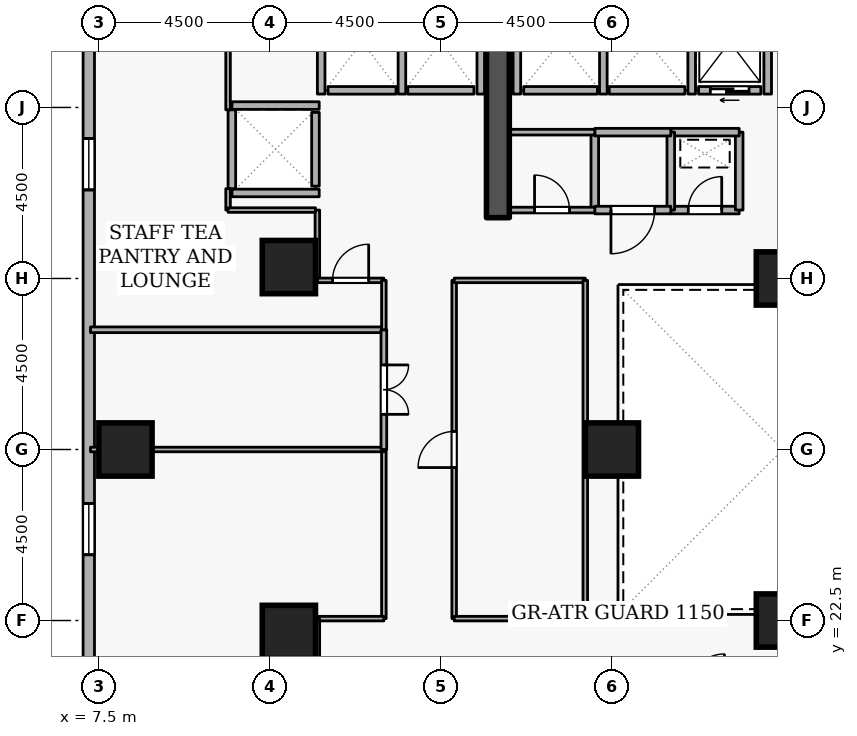
"""IFC4 building model, lengths in metres.
Left out: names, types, materials, properties, quantities, classifications, styles, units other than length and angle.
Written with IfcOpenShell. Run it as: python <this file> out.ifc"""

import sys

from ifc_helpers import new_model, si_unit, direction, frame, frame_2d, origin, origin_2d, place, context, subcontext, project, spatial, rectangle, extrude, element, fill, save


model = new_model("IFC4")
c1 = context("Model", 3, precision=1e-05, world=origin(), true_north=direction((0.0, 1.0)))
c2 = subcontext(c1, "Body", "Model", "MODEL_VIEW")
j1 = project(units=[si_unit("LENGTHUNIT", "METRE"), si_unit("PLANEANGLEUNIT", "RADIAN")], contexts=[c1])
p1 = place(None, origin())
s1 = spatial("IfcSite", under=j1, at=p1, CompositionType="ELEMENT")
p2 = place(p1, origin())
s2 = spatial("IfcBuilding", under=s1, at=p2, CompositionType="ELEMENT")
p3 = place(p2, frame((0.0, 0.0, 68.1)))
s3 = spatial("IfcBuildingStorey", under=s2, at=p3, CompositionType="ELEMENT", Elevation=68.1)
p4 = place(p3, frame((18.0, 33.1, 0.0), z_axis=(0.0, 0.0, 1.0), x_axis=(0.0, 1.0, 0.0)))
e1 = element("IfcWall", 1, at=p4, inside=s3, PredefinedType="SHEAR", context=c2, shape_type="SweptSolid", body=[
    extrude(rectangle(XDim=5.7, YDim=0.6, at=frame_2d((2.85, 0.0))), origin(), (0.0, 0.0, 1.0), 3.6),
])
for number, where, z_axis, x_axis in (
    (2, (8.2, 27.0, 0.0), (0.0, 0.0, 1.0), (1.0, 0.0, 0.0)),
    (3, (12.5, 22.2, 0.0), (0.0, 0.0, 1.0), (1.0, 0.0, 0.0)),
    (4, (12.5, 31.8, 0.0), (0.0, 0.0, 1.0), (1.0, 0.0, 0.0)),
    (5, (25.5, 22.5, 0.0), (0.0, 0.0, 1.0), (1.0, 0.0, 0.0)),
    (6, (25.5, 31.5, 0.0), (0.0, 0.0, 1.0), (1.0, 0.0, 0.0)),
    (7, (21.0, 27.0, 0.0), (0.0, 0.0, 1.0), (1.0, 0.0, 0.0)),
):
    element("IfcColumn", number, at=place(p3, frame(where, z_axis=z_axis, x_axis=x_axis)), inside=s3, PredefinedType="COLUMN", context=c2, shape_type="SweptSolid", body=[
        extrude(rectangle(XDim=1.4, YDim=1.4, at=origin_2d()), origin(), (0.0, 0.0, 1.0), 3.6),
    ])
p5 = place(p3, frame((7.235, 42.681, 0.0), z_axis=(0.0, 0.0, 1.0), x_axis=(0.0, -1.0, 0.0)))
e8 = element("IfcWall", 8, at=p5, inside=s3, PredefinedType="STANDARD", context=c2, shape_type="SweptSolid", body=[
    extrude(rectangle(XDim=37.362, YDim=0.3, at=frame_2d((18.681, 0.0))), origin(), (0.0, 0.0, 1.0), 2.66),
])
p6 = place(p5, frame((7.5, 0.0, 0.72)))
e9 = element("IfcOpeningElement", 9, at=p6, cuts=e8, PredefinedType="OPENING", context=c2, shape_type="SweptSolid", body=[
    extrude(rectangle(XDim=1.35, YDim=1.05, at=frame_2d((0.675, 0.525))), frame((0.0, 0.16, 0.0), z_axis=(0.0, -1.0, 0.0), x_axis=(1.0, 0.0, 0.0)), (0.0, 0.0, 1.0), 0.32),
])
p7 = place(p5, frame((17.1, 0.0, 0.72)))
e10 = element("IfcOpeningElement", 10, at=p7, cuts=e8, PredefinedType="OPENING", context=c2, shape_type="SweptSolid", body=[
    extrude(rectangle(XDim=1.35, YDim=1.05, at=frame_2d((0.675, 0.525))), frame((0.0, 0.16, 0.0), z_axis=(0.0, -1.0, 0.0), x_axis=(1.0, 0.0, 0.0)), (0.0, 0.0, 1.0), 0.32),
])
p8 = place(p5, frame((21.9, 0.0, 0.72)))
e11 = element("IfcOpeningElement", 11, at=p8, cuts=e8, PredefinedType="OPENING", context=c2, shape_type="SweptSolid", body=[
    extrude(rectangle(XDim=1.35, YDim=1.05, at=frame_2d((0.675, 0.525))), frame((0.0, 0.16, 0.0), z_axis=(0.0, -1.0, 0.0), x_axis=(1.0, 0.0, 0.0)), (0.0, 0.0, 1.0), 0.32),
])
p9 = place(p3, frame((24.92, 36.45, 0.0), z_axis=(0.0, 0.0, 1.0), x_axis=(-1.0, 0.0, 0.0)))
e12 = element("IfcWall", 12, at=p9, inside=s3, PredefinedType="STANDARD", context=c2, shape_type="SweptSolid", body=[
    extrude(rectangle(XDim=1.64, YDim=0.2, at=frame_2d((0.82, 0.0))), origin(), (0.0, 0.0, 1.0), 3.26),
])
p10 = place(p9, frame((0.31, 0.0, 0.0)))
e13 = element("IfcOpeningElement", 13, at=p10, cuts=e12, PredefinedType="OPENING", context=c2, shape_type="SweptSolid", body=[
    extrude(rectangle(XDim=1.02, YDim=2.06, at=frame_2d((0.51, 1.03))), frame((0.0, 0.11, 0.0), z_axis=(0.0, -1.0, 0.0), x_axis=(1.0, 0.0, 0.0)), (0.0, 0.0, 1.0), 0.22),
])
p11 = place(p3, frame((22.92, 36.45, 0.0), z_axis=(0.0, 0.0, 1.0), x_axis=(-1.0, 0.0, 0.0)))
e14 = element("IfcWall", 14, at=p11, inside=s3, PredefinedType="STANDARD", context=c2, shape_type="SweptSolid", body=[
    extrude(rectangle(XDim=1.99, YDim=0.2, at=frame_2d((0.995, 0.0))), origin(), (0.0, 0.0, 1.0), 3.26),
])
p12 = place(p3, frame((20.62, 36.45, 0.0), z_axis=(0.0, 0.0, 1.0), x_axis=(-1.0, 0.0, 0.0)))
e15 = element("IfcWall", 15, at=p12, inside=s3, PredefinedType="STANDARD", context=c2, shape_type="SweptSolid", body=[
    extrude(rectangle(XDim=1.94, YDim=0.2, at=frame_2d((0.97, 0.0))), origin(), (0.0, 0.0, 1.0), 3.26),
])
p13 = place(p3, frame((17.37, 36.45, 0.0), z_axis=(0.0, 0.0, 1.0), x_axis=(-1.0, 0.0, 0.0)))
e16 = element("IfcWall", 16, at=p13, inside=s3, PredefinedType="STANDARD", context=c2, shape_type="SweptSolid", body=[
    extrude(rectangle(XDim=1.74, YDim=0.2, at=frame_2d((0.87, 0.0))), origin(), (0.0, 0.0, 1.0), 3.26),
])
p14 = place(p3, frame((15.32, 36.45, 0.0), z_axis=(0.0, 0.0, 1.0), x_axis=(-1.0, 0.0, 0.0)))
e17 = element("IfcWall", 17, at=p14, inside=s3, PredefinedType="STANDARD", context=c2, shape_type="SweptSolid", body=[
    extrude(rectangle(XDim=1.79, YDim=0.2, at=frame_2d((0.895, 0.0))), origin(), (0.0, 0.0, 1.0), 3.26),
])
p15 = place(p3, frame((13.2, 33.93, 0.0), z_axis=(0.0, 0.0, 1.0), x_axis=(0.0, 1.0, 0.0)))
e18 = element("IfcWall", 18, at=p15, inside=s3, PredefinedType="STANDARD", context=c2, shape_type="SweptSolid", body=[
    extrude(rectangle(XDim=1.94, YDim=0.2, at=frame_2d((0.97, 0.0))), origin(), (0.0, 0.0, 1.0), 3.26),
])
for number, where, z_axis, x_axis in (
    (19, (25.1, 36.352, 0.0), (0.0, 0.0, 1.0), (0.0, 1.0, 0.0)),
    (20, (23.1, 36.352, 0.0), (0.0, 0.0, 1.0), (0.0, 1.0, 0.0)),
    (21, (20.775, 36.352, 0.0), (0.0, 0.0, 1.0), (0.0, 1.0, 0.0)),
    (22, (18.5, 36.352, 0.0), (0.0, 0.0, 1.0), (0.0, 1.0, 0.0)),
):
    element("IfcWall", number, at=place(p3, frame(where, z_axis=z_axis, x_axis=x_axis)), inside=s3, PredefinedType="STANDARD", context=c2, shape_type="SweptSolid", body=[
        extrude(rectangle(XDim=2.436, YDim=0.2, at=frame_2d((1.218, 0.0))), origin(), (0.0, 0.0, 1.0), 3.26),
    ])
p16 = place(p3, frame((17.55, 36.352, 0.0), z_axis=(0.0, 0.0, 1.0), x_axis=(0.0, 1.0, 0.0)))
e23 = element("IfcWall", 23, at=p16, inside=s3, PredefinedType="STANDARD", context=c2, shape_type="SweptSolid", body=[
    extrude(rectangle(XDim=2.636, YDim=0.2, at=frame_2d((1.318, 0.0))), origin(), (0.0, 0.0, 1.0), 2.465),
])
for number, where, z_axis, x_axis in (
    (24, (15.475, 36.352, 0.0), (0.0, 0.0, 1.0), (0.0, 1.0, 0.0)),
    (25, (13.35, 36.352, 0.0), (0.0, 0.0, 1.0), (0.0, 1.0, 0.0)),
):
    element("IfcWall", number, at=place(p3, frame(where, z_axis=z_axis, x_axis=x_axis)), inside=s3, PredefinedType="STANDARD", context=c2, shape_type="SweptSolid", body=[
        extrude(rectangle(XDim=2.636, YDim=0.2, at=frame_2d((1.318, 0.0))), origin(), (0.0, 0.0, 1.0), 3.26),
    ])
for number, where, z_axis, x_axis in (
    (26, (11.002, 36.05, 0.0), (0.0, 0.0, 1.0), (1.0, 0.0, 0.0)),
    (27, (11.002, 33.75, 0.0), (0.0, 0.0, 1.0), (1.0, 0.0, 0.0)),
):
    element("IfcWall", number, at=place(p3, frame(where, z_axis=z_axis, x_axis=x_axis)), inside=s3, PredefinedType="STANDARD", context=c2, shape_type="SweptSolid", body=[
        extrude(rectangle(XDim=2.296, YDim=0.2, at=frame_2d((1.148, 0.0))), origin(), (0.0, 0.0, 1.0), 3.26),
    ])
p17 = place(p3, frame((11.0, 33.862, 0.0), z_axis=(0.0, 0.0, 1.0), x_axis=(0.0, 1.0, 0.0)))
e28 = element("IfcWall", 28, at=p17, inside=s3, PredefinedType="STANDARD", context=c2, shape_type="SweptSolid", body=[
    extrude(rectangle(XDim=2.076, YDim=0.2, at=frame_2d((1.038, 0.0))), origin(), (0.0, 0.0, 1.0), 3.26),
])
p18 = place(p3, frame((22.55, 33.3, 0.0), z_axis=(0.0, 0.0, 1.0), x_axis=(1.0, 0.0, 0.0)))
e29 = element("IfcWall", 29, at=p18, inside=s3, PredefinedType="STANDARD", context=c2, shape_type="SweptSolid", body=[
    extrude(rectangle(XDim=1.8, YDim=0.2, at=frame_2d((0.9, 0.0))), origin(), (0.0, 0.0, 1.0), 3.26),
])
p19 = place(p18, frame((0.46, 0.0, 0.0)))
e30 = element("IfcOpeningElement", 30, at=p19, cuts=e29, PredefinedType="OPENING", context=c2, shape_type="SweptSolid", body=[
    extrude(rectangle(XDim=0.88, YDim=2.04, at=frame_2d((0.44, 1.02))), frame((0.0, 0.11, 0.0), z_axis=(0.0, -1.0, 0.0), x_axis=(1.0, 0.0, 0.0)), (0.0, 0.0, 1.0), 0.22),
])
p20 = place(p3, frame((24.35, 33.3, 0.0), z_axis=(0.0, 0.0, 1.0), x_axis=(0.0, 1.0, 0.0)))
e31 = element("IfcWall", 31, at=p20, inside=s3, PredefinedType="STANDARD", context=c2, shape_type="SweptSolid", body=[
    extrude(rectangle(XDim=2.05, YDim=0.2, at=frame_2d((1.025, 0.0))), origin(), (0.0, 0.0, 1.0), 3.26),
])
p21 = place(p3, frame((24.35, 35.35, 0.0), z_axis=(0.0, 0.0, 1.0), x_axis=(-1.0, 0.0, 0.0)))
e32 = element("IfcWall", 32, at=p21, inside=s3, PredefinedType="STANDARD", context=c2, shape_type="SweptSolid", body=[
    extrude(rectangle(XDim=1.8, YDim=0.2, at=frame_2d((0.9, 0.0))), origin(), (0.0, 0.0, 1.0), 3.26),
])
for number, where, z_axis, x_axis in (
    (33, (22.55, 35.35, 0.0), (0.0, 0.0, 1.0), (0.0, -1.0, 0.0)),
    (34, (20.55, 33.3, 0.0), (0.0, 0.0, 1.0), (0.0, 1.0, 0.0)),
):
    element("IfcWall", number, at=place(p3, frame(where, z_axis=z_axis, x_axis=x_axis)), inside=s3, PredefinedType="STANDARD", context=c2, shape_type="SweptSolid", body=[
        extrude(rectangle(XDim=2.05, YDim=0.2, at=frame_2d((1.025, 0.0))), origin(), (0.0, 0.0, 1.0), 3.26),
    ])
p22 = place(p3, frame((20.55, 35.35, 0.0), z_axis=(0.0, 0.0, 1.0), x_axis=(1.0, 0.0, 0.0)))
e35 = element("IfcWall", 35, at=p22, inside=s3, PredefinedType="STANDARD", context=c2, shape_type="SweptSolid", body=[
    extrude(rectangle(XDim=2.0, YDim=0.2, at=frame_2d((1.0, 0.0))), origin(), (0.0, 0.0, 1.0), 3.26),
])
p23 = place(p3, frame((22.55, 33.3, 0.0), z_axis=(0.0, 0.0, 1.0), x_axis=(-1.0, 0.0, 0.0)))
e36 = element("IfcWall", 36, at=p23, inside=s3, PredefinedType="STANDARD", context=c2, shape_type="SweptSolid", body=[
    extrude(rectangle(XDim=2.0, YDim=0.2, at=frame_2d((1.0, 0.0))), origin(), (0.0, 0.0, 1.0), 3.26),
])
p24 = place(p23, frame((0.425, 0.0, 0.0)))
e37 = element("IfcOpeningElement", 37, at=p24, cuts=e36, PredefinedType="OPENING", context=c2, shape_type="SweptSolid", body=[
    extrude(rectangle(XDim=1.15, YDim=2.1, at=frame_2d((0.575, 1.05))), frame((0.0, 0.11, 0.0), z_axis=(0.0, -1.0, 0.0), x_axis=(1.0, 0.0, 0.0)), (0.0, 0.0, 1.0), 0.22),
])
p25 = place(p3, frame((18.3, 33.3, 0.0), z_axis=(0.0, 0.0, 1.0), x_axis=(1.0, 0.0, 0.0)))
e38 = element("IfcWall", 38, at=p25, inside=s3, PredefinedType="PARTITIONING", context=c2, shape_type="SweptSolid", body=[
    extrude(rectangle(XDim=2.25, YDim=0.15, at=frame_2d((1.125, 0.0))), origin(), (0.0, 0.0, 1.0), 3.26),
])
p26 = place(p25, frame((0.665, 0.0, 0.0)))
e39 = element("IfcOpeningElement", 39, at=p26, cuts=e38, PredefinedType="OPENING", context=c2, shape_type="SweptSolid", body=[
    extrude(rectangle(XDim=0.92, YDim=2.08, at=frame_2d((0.46, 1.04))), frame((0.0, 0.085, 0.0), z_axis=(0.0, -1.0, 0.0), x_axis=(1.0, 0.0, 0.0)), (0.0, 0.0, 1.0), 0.17),
])
p27 = place(p3, frame((20.55, 35.35, 0.0), z_axis=(0.0, 0.0, 1.0), x_axis=(-1.0, 0.0, 0.0)))
e40 = element("IfcWall", 40, at=p27, inside=s3, PredefinedType="PARTITIONING", context=c2, shape_type="SweptSolid", body=[
    extrude(rectangle(XDim=2.25, YDim=0.15, at=frame_2d((1.125, 0.0))), origin(), (0.0, 0.0, 1.0), 3.26),
])
p28 = place(p3, frame((15.0, 27.0, 0.0), z_axis=(0.0, 0.0, 1.0), x_axis=(0.0, -1.0, 0.0)))
e41 = element("IfcWall", 41, at=p28, inside=s3, PredefinedType="PARTITIONING", context=c2, shape_type="SweptSolid", body=[
    extrude(rectangle(XDim=4.45, YDim=0.12, at=frame_2d((2.225, 0.0))), origin(), (0.0, 0.0, 1.0), 3.26),
])
p29 = place(p3, frame((15.0, 22.55, 0.0), z_axis=(0.0, 0.0, 1.0), x_axis=(-1.0, 0.0, 0.0)))
e42 = element("IfcWall", 42, at=p29, inside=s3, PredefinedType="PARTITIONING", context=c2, shape_type="SweptSolid", body=[
    extrude(rectangle(XDim=1.75, YDim=0.12, at=frame_2d((0.875, 0.0))), origin(), (0.0, 0.0, 1.0), 3.26),
])
p30 = place(p3, frame((13.25, 22.55, 0.0), z_axis=(0.0, 0.0, 1.0), x_axis=(0.0, -1.0, 0.0)))
e43 = element("IfcWall", 43, at=p30, inside=s3, PredefinedType="PARTITIONING", context=c2, shape_type="SweptSolid", body=[
    extrude(rectangle(XDim=1.85, YDim=0.12, at=frame_2d((0.925, 0.0))), origin(), (0.0, 0.0, 1.0), 3.26),
])
p31 = place(p3, frame((7.28, 27.0, 0.0), z_axis=(0.0, 0.0, 1.0), x_axis=(1.0, 0.0, 0.0)))
e44 = element("IfcWall", 44, at=p31, inside=s3, PredefinedType="PARTITIONING", context=c2, shape_type="SweptSolid", body=[
    extrude(rectangle(XDim=7.72, YDim=0.12, at=frame_2d((3.86, 0.0))), origin(), (0.0, 0.0, 1.0), 2.798),
])
p32 = place(p3, frame((7.28, 30.15, 0.0), z_axis=(0.0, 0.0, 1.0), x_axis=(1.0, 0.0, 0.0)))
e45 = element("IfcWall", 45, at=p32, inside=s3, PredefinedType="PARTITIONING", context=c2, shape_type="SweptSolid", body=[
    extrude(rectangle(XDim=7.72, YDim=0.15, at=frame_2d((3.86, 0.0))), origin(), (0.0, 0.0, 1.0), 3.26),
])
p33 = place(p3, frame((15.0, 30.15, 0.0), z_axis=(0.0, 0.0, 1.0), x_axis=(0.0, -1.0, 0.0)))
e46 = element("IfcWall", 46, at=p33, inside=s3, PredefinedType="PARTITIONING", context=c2, shape_type="SweptSolid", body=[
    extrude(rectangle(XDim=3.15, YDim=0.15, at=frame_2d((1.575, 0.0))), origin(), (0.0, 0.0, 1.0), 3.26),
])
p34 = place(p33, frame((0.925, 0.0, 0.0)))
e47 = element("IfcOpeningElement", 47, at=p34, cuts=e46, PredefinedType="OPENING", context=c2, shape_type="SweptSolid", body=[
    extrude(rectangle(XDim=1.3, YDim=2.12, at=frame_2d((0.65, 1.06))), frame((0.0, 0.085, 0.0), z_axis=(0.0, -1.0, 0.0), x_axis=(1.0, 0.0, 0.0)), (0.0, 0.0, 1.0), 0.17),
])
p35 = place(p3, frame((13.25, 33.3, 0.0), z_axis=(0.0, 0.0, 1.0), x_axis=(0.0, -1.0, 0.0)))
e48 = element("IfcWall", 48, at=p35, inside=s3, PredefinedType="PARTITIONING", context=c2, shape_type="SweptSolid", body=[
    extrude(rectangle(XDim=1.85, YDim=0.12, at=frame_2d((0.925, 0.0))), origin(), (0.0, 0.0, 1.0), 3.26),
])
p36 = place(p3, frame((13.25, 31.45, 0.0), z_axis=(0.0, 0.0, 1.0), x_axis=(1.0, 0.0, 0.0)))
e49 = element("IfcWall", 49, at=p36, inside=s3, PredefinedType="PARTITIONING", context=c2, shape_type="SweptSolid", body=[
    extrude(rectangle(XDim=1.75, YDim=0.12, at=frame_2d((0.875, 0.0))), origin(), (0.0, 0.0, 1.0), 3.26),
])
p37 = place(p36, frame((0.4, 0.0, 0.0)))
e50 = element("IfcOpeningElement", 50, at=p37, cuts=e49, PredefinedType="OPENING", context=c2, shape_type="SweptSolid", body=[
    extrude(rectangle(XDim=0.95, YDim=2.1, at=frame_2d((0.475, 1.05))), frame((0.0, 0.07, 0.0), z_axis=(0.0, -1.0, 0.0), x_axis=(1.0, 0.0, 0.0)), (0.0, 0.0, 1.0), 0.14),
])
p38 = place(p3, frame((15.0, 31.45, 0.0), z_axis=(0.0, 0.0, 1.0), x_axis=(0.0, -1.0, 0.0)))
e51 = element("IfcWall", 51, at=p38, inside=s3, PredefinedType="PARTITIONING", context=c2, shape_type="SweptSolid", body=[
    extrude(rectangle(XDim=1.3, YDim=0.12, at=frame_2d((0.65, 0.0))), origin(), (0.0, 0.0, 1.0), 3.26),
])
p39 = place(p3, frame((10.9, 45.22, 0.0), z_axis=(0.0, 0.0, 1.0), x_axis=(0.0, -1.0, 0.0)))
e52 = element("IfcWall", 52, at=p39, inside=s3, PredefinedType="PARTITIONING", context=c2, shape_type="SweptSolid", body=[
    extrude(rectangle(XDim=9.282, YDim=0.12, at=frame_2d((4.641, 0.0))), origin(), (0.0, 0.0, 1.0), 3.26),
])
p40 = place(p3, frame((10.9, 33.862, 0.0), z_axis=(0.0, 0.0, 1.0), x_axis=(0.0, -1.0, 0.0)))
e53 = element("IfcWall", 53, at=p40, inside=s3, PredefinedType="PARTITIONING", context=c2, shape_type="SweptSolid", body=[
    extrude(rectangle(XDim=0.562, YDim=0.12, at=frame_2d((0.281, 0.0))), origin(), (0.0, 0.0, 1.0), 3.26),
])
p41 = place(p3, frame((10.9, 33.3, 0.0), z_axis=(0.0, 0.0, 1.0), x_axis=(1.0, 0.0, 0.0)))
e54 = element("IfcWall", 54, at=p41, inside=s3, PredefinedType="PARTITIONING", context=c2, shape_type="SweptSolid", body=[
    extrude(rectangle(XDim=2.3, YDim=0.12, at=frame_2d((1.15, 0.0))), origin(), (0.0, 0.0, 1.0), 3.26),
])
p42 = place(p3, frame((16.85, 22.55, 0.0), z_axis=(0.0, 0.0, 1.0), x_axis=(0.0, 1.0, 0.0)))
e55 = element("IfcWall", 55, at=p42, inside=s3, PredefinedType="PARTITIONING", context=c2, shape_type="SweptSolid", body=[
    extrude(rectangle(XDim=8.9, YDim=0.12, at=frame_2d((4.45, 0.0))), origin(), (0.0, 0.0, 1.0), 3.26),
])
p43 = place(p42, frame((3.975, 0.0, 0.0)))
e56 = element("IfcOpeningElement", 56, at=p43, cuts=e55, PredefinedType="OPENING", context=c2, shape_type="SweptSolid", body=[
    extrude(rectangle(XDim=0.95, YDim=2.1, at=frame_2d((0.475, 1.05))), frame((0.0, 0.07, 0.0), z_axis=(0.0, -1.0, 0.0), x_axis=(1.0, 0.0, 0.0)), (0.0, 0.0, 1.0), 0.14),
])
p44 = place(p3, frame((16.85, 31.45, 0.0), z_axis=(0.0, 0.0, 1.0), x_axis=(1.0, 0.0, 0.0)))
e57 = element("IfcWall", 57, at=p44, inside=s3, PredefinedType="PARTITIONING", context=c2, shape_type="SweptSolid", body=[
    extrude(rectangle(XDim=3.45, YDim=0.12, at=frame_2d((1.725, 0.0))), origin(), (0.0, 0.0, 1.0), 3.26),
])
p45 = place(p3, frame((20.3, 31.45, 0.0), z_axis=(0.0, 0.0, 1.0), x_axis=(0.0, -1.0, 0.0)))
e58 = element("IfcWall", 58, at=p45, inside=s3, PredefinedType="PARTITIONING", context=c2, shape_type="SweptSolid", body=[
    extrude(rectangle(XDim=8.9, YDim=0.12, at=frame_2d((4.45, 0.0))), origin(), (0.0, 0.0, 1.0), 3.26),
])
p46 = place(p3, frame((20.3, 22.55, 0.0), z_axis=(0.0, 0.0, 1.0), x_axis=(-1.0, 0.0, 0.0)))
e59 = element("IfcWall", 59, at=p46, inside=s3, PredefinedType="PARTITIONING", context=c2, shape_type="SweptSolid", body=[
    extrude(rectangle(XDim=3.45, YDim=0.12, at=frame_2d((1.725, 0.0))), origin(), (0.0, 0.0, 1.0), 3.26),
])
p47 = place(p6, origin())
e60 = element("IfcWindow", 60, at=p47, inside=s3, PartitioningType="SINGLE_PANEL", PredefinedType="WINDOW", context=c2, shape_type="SweptSolid", body=[
    extrude(rectangle(XDim=1.35, YDim=1.05, at=frame_2d((0.675, 0.525))), frame((0.0, 0.03, 0.0), z_axis=(0.0, -1.0, 0.0), x_axis=(1.0, 0.0, 0.0)), (0.0, 0.0, 1.0), 0.06),
])
fill(e9, e60)
p48 = place(p7, origin())
e61 = element("IfcWindow", 61, at=p48, inside=s3, PartitioningType="SINGLE_PANEL", PredefinedType="WINDOW", context=c2, shape_type="SweptSolid", body=[
    extrude(rectangle(XDim=1.35, YDim=1.05, at=frame_2d((0.675, 0.525))), frame((0.0, 0.03, 0.0), z_axis=(0.0, -1.0, 0.0), x_axis=(1.0, 0.0, 0.0)), (0.0, 0.0, 1.0), 0.06),
])
fill(e10, e61)
p49 = place(p10, origin())
e62 = element("IfcDoor", 62, at=p49, inside=s3, OperationType="SLIDING_TO_LEFT", PredefinedType="DOOR", context=c2, shape_type="SweptSolid", body=[
    extrude(rectangle(XDim=1.02, YDim=2.06, at=frame_2d((0.51, 1.03))), frame((0.0, 0.025, 0.0), z_axis=(0.0, -1.0, 0.0), x_axis=(1.0, 0.0, 0.0)), (0.0, 0.0, 1.0), 0.05),
])
fill(e13, e62)
p50 = place(p19, origin())
e63 = element("IfcDoor", 63, at=p50, inside=s3, OperationType="SINGLE_SWING_RIGHT", PredefinedType="DOOR", context=c2, shape_type="SweptSolid", body=[
    extrude(rectangle(XDim=0.88, YDim=2.04, at=frame_2d((0.44, 1.02))), frame((0.0, 0.025, 0.0), z_axis=(0.0, -1.0, 0.0), x_axis=(1.0, 0.0, 0.0)), (0.0, 0.0, 1.0), 0.05),
])
fill(e30, e63)
p51 = place(p26, origin())
e64 = element("IfcDoor", 64, at=p51, inside=s3, OperationType="SINGLE_SWING_LEFT", PredefinedType="DOOR", context=c2, shape_type="SweptSolid", body=[
    extrude(rectangle(XDim=0.92, YDim=2.08, at=frame_2d((0.46, 1.04))), frame((0.0, 0.025, 0.0), z_axis=(0.0, -1.0, 0.0), x_axis=(1.0, 0.0, 0.0)), (0.0, 0.0, 1.0), 0.05),
])
fill(e39, e64)
p52 = place(p24, origin())
e65 = element("IfcDoor", 65, at=p52, inside=s3, OperationType="SINGLE_SWING_RIGHT", PredefinedType="DOOR", context=c2, shape_type="SweptSolid", body=[
    extrude(rectangle(XDim=1.15, YDim=2.1, at=frame_2d((0.575, 1.05))), frame((0.0, 0.025, 0.0), z_axis=(0.0, -1.0, 0.0), x_axis=(1.0, 0.0, 0.0)), (0.0, 0.0, 1.0), 0.05),
])
fill(e37, e65)
p53 = place(p34, origin())
e66 = element("IfcDoor", 66, at=p53, inside=s3, OperationType="DOUBLE_DOOR_SINGLE_SWING", PredefinedType="DOOR", context=c2, shape_type="SweptSolid", body=[
    extrude(rectangle(XDim=1.3, YDim=2.12, at=frame_2d((0.65, 1.06))), frame((0.0, 0.025, 0.0), z_axis=(0.0, -1.0, 0.0), x_axis=(1.0, 0.0, 0.0)), (0.0, 0.0, 1.0), 0.05),
])
fill(e47, e66)
p54 = place(p37, origin())
e67 = element("IfcDoor", 67, at=p54, inside=s3, OperationType="SINGLE_SWING_RIGHT", PredefinedType="DOOR", context=c2, shape_type="SweptSolid", body=[
    extrude(rectangle(XDim=0.95, YDim=2.1, at=frame_2d((0.475, 1.05))), frame((0.0, 0.025, 0.0), z_axis=(0.0, -1.0, 0.0), x_axis=(1.0, 0.0, 0.0)), (0.0, 0.0, 1.0), 0.05),
])
fill(e50, e67)
p55 = place(p43, origin())
e68 = element("IfcDoor", 68, at=p55, inside=s3, OperationType="SINGLE_SWING_LEFT", PredefinedType="DOOR", context=c2, shape_type="SweptSolid", body=[
    extrude(rectangle(XDim=0.95, YDim=2.1, at=frame_2d((0.475, 1.05))), frame((0.0, 0.025, 0.0), z_axis=(0.0, -1.0, 0.0), x_axis=(1.0, 0.0, 0.0)), (0.0, 0.0, 1.0), 0.05),
])
fill(e56, e68)
save(model, sys.argv[1])
